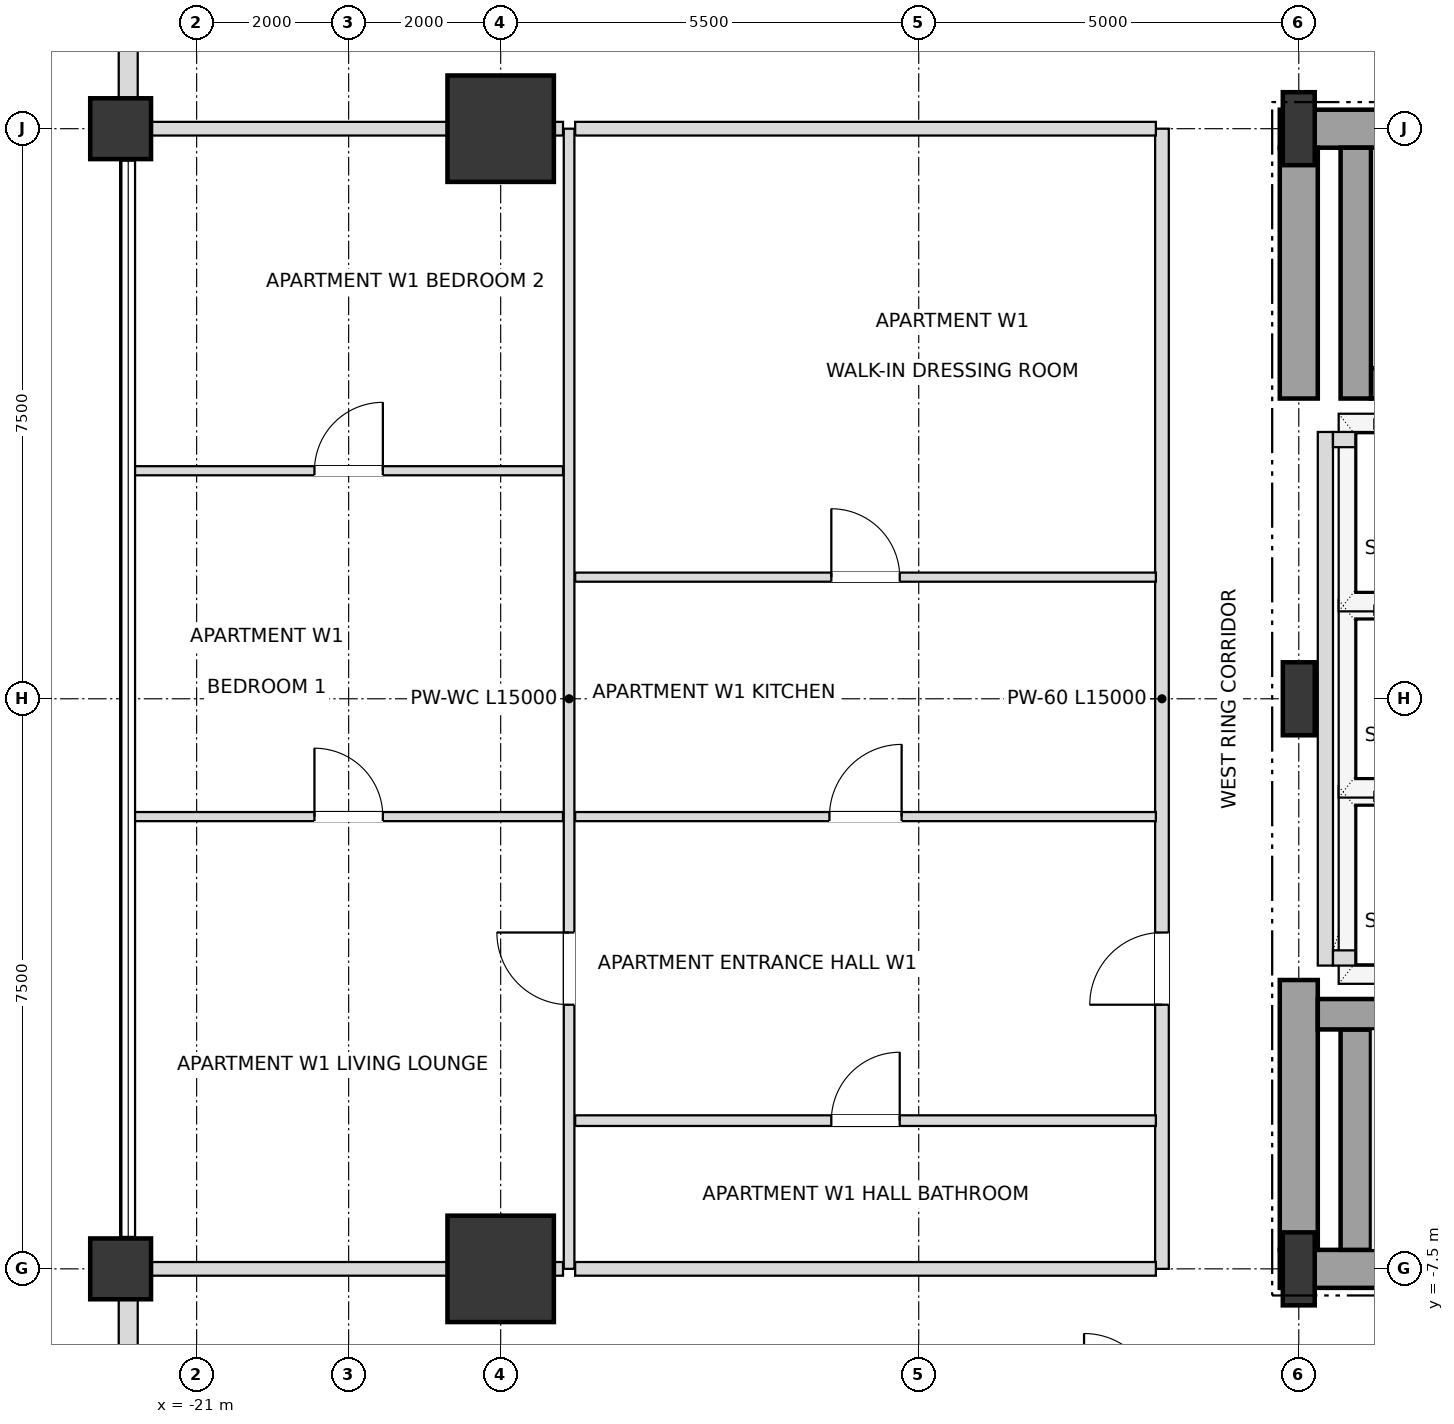
"""IFC4 building model, lengths in metres.
Left out: names, types, materials, properties, quantities, classifications, styles, units other than length and angle.
Written with IfcOpenShell. Run it as: python <this file> out.ifc"""

import sys

from ifc_helpers import new_model, si_unit, direction, frame, frame_2d, origin, origin_2d, place, context, subcontext, project, spatial, rectangle, i_section, extrude, element, fill, save


model = new_model("IFC4")
c1 = context("Model", 3, precision=1e-05, world=origin(), true_north=direction((0.0, 1.0)))
c2 = subcontext(c1, "Body", "Model", "MODEL_VIEW")
j1 = project(units=[si_unit("LENGTHUNIT", "METRE"), si_unit("PLANEANGLEUNIT", "RADIAN")], contexts=[c1])
p1 = place(None, origin())
s1 = spatial("IfcSite", under=j1, at=p1, CompositionType="ELEMENT")
p2 = place(p1, origin())
s2 = spatial("IfcBuilding", under=s1, at=p2, CompositionType="ELEMENT")
p3 = place(p2, frame((0.0, 0.0, 64.8)))
s3 = spatial("IfcBuildingStorey", under=s2, at=p3, CompositionType="ELEMENT", Elevation=64.8)
for number, where, z_axis, x_axis in (
    (1, (-6.5, -7.5, 0.0), (0.0, 0.0, 1.0), (1.0, 0.0, 0.0)),
    (2, (-6.5, 0.0, 0.0), (0.0, 0.0, 1.0), (1.0, 0.0, 0.0)),
    (3, (-6.5, 7.5, 0.0), (0.0, 0.0, 1.0), (1.0, 0.0, 0.0)),
):
    element("IfcColumn", number, at=place(p3, frame(where, z_axis=z_axis, x_axis=x_axis)), inside=s3, PredefinedType="COLUMN", context=c2, shape_type="SweptSolid", body=[
        extrude(i_section(OverallWidth=0.42, OverallDepth=0.96, WebThickness=0.022, FlangeThickness=0.034, at=origin_2d()), origin(), (0.0, 0.0, 1.0), 3.6),
    ])
for number, where, z_axis, x_axis in (
    (4, (-17.0, 7.5, 0.0), (0.0, 0.0, 1.0), (1.0, 0.0, 0.0)),
    (5, (-17.0, -7.5, 0.0), (0.0, 0.0, 1.0), (1.0, 0.0, 0.0)),
):
    element("IfcColumn", number, at=place(p3, frame(where, z_axis=z_axis, x_axis=x_axis)), inside=s3, PredefinedType="USERDEFINED", context=c2, shape_type="SweptSolid", body=[
        extrude(rectangle(XDim=1.4, YDim=1.4, at=origin_2d()), origin(), (0.0, 0.0, 1.0), 3.6),
    ])
for number, where, z_axis, x_axis in (
    (6, (-22.0, -7.5, 0.0), (0.0, 0.0, 1.0), (1.0, 0.0, 0.0)),
    (7, (-22.0, 7.5, 0.0), (0.0, 0.0, 1.0), (1.0, 0.0, 0.0)),
):
    element("IfcColumn", number, at=place(p3, frame(where, z_axis=z_axis, x_axis=x_axis)), inside=s3, PredefinedType="COLUMN", context=c2, shape_type="SweptSolid", body=[
        extrude(rectangle(XDim=0.8, YDim=0.8, at=origin_2d()), origin(), (0.0, 0.0, 1.0), 3.6),
    ])
p4 = place(p3, frame((-21.9, 12.605, 0.0), z_axis=(0.0, 0.0, 1.0), x_axis=(0.0, -1.0, 0.0)))
e8 = element("IfcWall", 8, at=p4, inside=s3, PredefinedType="SOLIDWALL", context=c2, shape_type="SweptSolid", body=[
    extrude(rectangle(XDim=4.71, YDim=0.25, at=frame_2d((2.355, 0.0))), origin(), (0.0, 0.0, 1.0), 2.736),
])
p5 = place(p4, frame((1.455, 0.0, 0.72)))
e9 = element("IfcOpeningElement", 9, at=p5, cuts=e8, PredefinedType="OPENING", context=c2, shape_type="SweptSolid", body=[
    extrude(rectangle(XDim=1.8, YDim=1.68, at=frame_2d((0.9, 0.84))), frame((0.0, 0.135, 0.0), z_axis=(0.0, -1.0, 0.0), x_axis=(1.0, 0.0, 0.0)), (0.0, 0.0, 1.0), 0.27),
])
p6 = place(p3, frame((-21.9, -7.895, 0.0), z_axis=(0.0, 0.0, 1.0), x_axis=(0.0, -1.0, 0.0)))
e10 = element("IfcWall", 10, at=p6, inside=s3, PredefinedType="SOLIDWALL", context=c2, shape_type="SweptSolid", body=[
    extrude(rectangle(XDim=4.71, YDim=0.25, at=frame_2d((2.355, 0.0))), origin(), (0.0, 0.0, 1.0), 2.736),
])
p7 = place(p6, frame((1.455, 0.0, 0.72)))
e11 = element("IfcOpeningElement", 11, at=p7, cuts=e10, PredefinedType="OPENING", context=c2, shape_type="SweptSolid", body=[
    extrude(rectangle(XDim=1.8, YDim=1.68, at=frame_2d((0.9, 0.84))), frame((0.0, 0.135, 0.0), z_axis=(0.0, -1.0, 0.0), x_axis=(1.0, 0.0, 0.0)), (0.0, 0.0, 1.0), 0.27),
])
p8 = place(p3, frame((-6.75, -7.5, 0.0), z_axis=(0.0, 0.0, 1.0), x_axis=(1.0, 0.0, 0.0)))
e12 = element("IfcWall", 12, at=p8, inside=s3, PredefinedType="SHEAR", context=c2, shape_type="SweptSolid", body=[
    extrude(rectangle(XDim=6.75, YDim=0.5, at=frame_2d((3.375, 0.0))), origin(), (0.0, 0.0, 1.0), 3.38),
])
p9 = place(p3, frame((-6.75, 7.5, 0.0), z_axis=(0.0, 0.0, 1.0), x_axis=(1.0, 0.0, 0.0)))
e13 = element("IfcWall", 13, at=p9, inside=s3, PredefinedType="SHEAR", context=c2, shape_type="SweptSolid", body=[
    extrude(rectangle(XDim=6.75, YDim=0.5, at=frame_2d((3.375, 0.0))), origin(), (0.0, 0.0, 1.0), 3.38),
])
p10 = place(p9, frame((1.65, 0.0, 0.0)))
e14 = element("IfcOpeningElement", 14, at=p10, cuts=e13, PredefinedType="OPENING", context=c2, shape_type="SweptSolid", body=[
    extrude(rectangle(XDim=1.05, YDim=2.15, at=frame_2d((0.525, 1.075))), frame((0.0, 0.26, 0.0), z_axis=(0.0, -1.0, 0.0), x_axis=(1.0, 0.0, 0.0)), (0.0, 0.0, 1.0), 0.52),
])
p11 = place(p3, frame((-6.5, -7.25, 0.0), z_axis=(0.0, 0.0, 1.0), x_axis=(0.0, 1.0, 0.0)))
e15 = element("IfcWall", 15, at=p11, inside=s3, PredefinedType="SHEAR", context=c2, shape_type="SweptSolid", body=[
    extrude(rectangle(XDim=3.55, YDim=0.5, at=frame_2d((1.775, 0.0))), origin(), (0.0, 0.0, 1.0), 3.38),
])
p12 = place(p3, frame((-6.5, 3.95, 0.0), z_axis=(0.0, 0.0, 1.0), x_axis=(0.0, 1.0, 0.0)))
e16 = element("IfcWall", 16, at=p12, inside=s3, PredefinedType="SHEAR", context=c2, shape_type="SweptSolid", body=[
    extrude(rectangle(XDim=3.3, YDim=0.5, at=frame_2d((1.65, 0.0))), origin(), (0.0, 0.0, 1.0), 3.38),
])
p13 = place(p3, frame((-5.75, -7.25, 0.0), z_axis=(0.0, 0.0, 1.0), x_axis=(0.0, 1.0, 0.0)))
e17 = element("IfcWall", 17, at=p13, inside=s3, PredefinedType="SHEAR", context=c2, shape_type="SweptSolid", body=[
    extrude(rectangle(XDim=2.9, YDim=0.4, at=frame_2d((1.45, 0.0))), origin(), (0.0, 0.0, 1.0), 3.38),
])
p14 = place(p3, frame((-6.25, -4.15, 0.0), z_axis=(0.0, 0.0, 1.0), x_axis=(1.0, 0.0, 0.0)))
e18 = element("IfcWall", 18, at=p14, inside=s3, PredefinedType="SHEAR", context=c2, shape_type="SweptSolid", body=[
    extrude(rectangle(XDim=7.78, YDim=0.4, at=frame_2d((3.89, 0.0))), origin(), (0.0, 0.0, 1.0), 3.38),
])
p15 = place(p3, frame((-5.55, 4.15, 0.0), z_axis=(0.0, 0.0, 1.0), x_axis=(1.0, 0.0, 0.0)))
e19 = element("IfcWall", 19, at=p15, inside=s3, PredefinedType="SHEAR", context=c2, shape_type="SweptSolid", body=[
    extrude(rectangle(XDim=7.08, YDim=0.4, at=frame_2d((3.54, 0.0))), origin(), (0.0, 0.0, 1.0), 3.38),
])
p16 = place(p3, frame((-5.75, 3.95, 0.0), z_axis=(0.0, 0.0, 1.0), x_axis=(0.0, 1.0, 0.0)))
e20 = element("IfcWall", 20, at=p16, inside=s3, PredefinedType="SHEAR", context=c2, shape_type="SweptSolid", body=[
    extrude(rectangle(XDim=3.3, YDim=0.4, at=frame_2d((1.65, 0.0))), origin(), (0.0, 0.0, 1.0), 3.38),
])
p17 = place(p3, frame((-6.15, -3.51, 0.0), z_axis=(0.0, 0.0, 1.0), x_axis=(0.0, 1.0, 0.0)))
e21 = element("IfcWall", 21, at=p17, inside=s3, PredefinedType="SOLIDWALL", context=c2, shape_type="SweptSolid", body=[
    extrude(rectangle(XDim=7.02, YDim=0.2, at=frame_2d((3.51, 0.0))), origin(), (0.0, 0.0, 1.0), 3.38),
])
for number, where, z_axis, x_axis in (
    (22, (-6.05, -3.41, 0.0), (0.0, 0.0, 1.0), (1.0, 0.0, 0.0)),
    (23, (-6.05, 3.41, 0.0), (0.0, 0.0, 1.0), (1.0, 0.0, 0.0)),
):
    element("IfcWall", number, at=place(p3, frame(where, z_axis=z_axis, x_axis=x_axis)), inside=s3, PredefinedType="SOLIDWALL", context=c2, shape_type="SweptSolid", body=[
        extrude(rectangle(XDim=2.2, YDim=0.2, at=frame_2d((1.1, 0.0))), origin(), (0.0, 0.0, 1.0), 3.38),
    ])
p18 = place(p3, frame((-16.1, -7.5, 0.0), z_axis=(0.0, 0.0, 1.0), x_axis=(0.0, 1.0, 0.0)))
e24 = element("IfcWall", 24, at=p18, inside=s3, PredefinedType="PARTITIONING", context=c2, shape_type="SweptSolid", body=[
    extrude(rectangle(XDim=15.0, YDim=0.14, at=frame_2d((7.5, 0.0))), origin(), (0.0, 0.0, 1.0), 3.38),
])
p19 = place(p18, frame((3.475, 0.0, 0.0)))
e25 = element("IfcOpeningElement", 25, at=p19, cuts=e24, PredefinedType="OPENING", context=c2, shape_type="SweptSolid", body=[
    extrude(rectangle(XDim=0.95, YDim=2.1, at=frame_2d((0.475, 1.05))), frame((0.0, 0.08, 0.0), z_axis=(0.0, -1.0, 0.0), x_axis=(1.0, 0.0, 0.0)), (0.0, 0.0, 1.0), 0.16),
])
p20 = place(p3, frame((-8.3, -7.5, 0.0), z_axis=(0.0, 0.0, 1.0), x_axis=(0.0, 1.0, 0.0)))
e26 = element("IfcWall", 26, at=p20, inside=s3, PredefinedType="PARTITIONING", context=c2, shape_type="SweptSolid", body=[
    extrude(rectangle(XDim=15.0, YDim=0.18, at=frame_2d((7.5, 0.0))), origin(), (0.0, 0.0, 1.0), 3.38),
])
p21 = place(p20, frame((3.475, 0.0, 0.0)))
e27 = element("IfcOpeningElement", 27, at=p21, cuts=e26, PredefinedType="OPENING", context=c2, shape_type="SweptSolid", body=[
    extrude(rectangle(XDim=0.95, YDim=2.15, at=frame_2d((0.475, 1.075))), frame((0.0, 0.1, 0.0), z_axis=(0.0, -1.0, 0.0), x_axis=(1.0, 0.0, 0.0)), (0.0, 0.0, 1.0), 0.2),
])
p22 = place(p3, frame((-21.9, -7.5, 0.0), z_axis=(0.0, 0.0, 1.0), x_axis=(1.0, 0.0, 0.0)))
e28 = element("IfcWall", 28, at=p22, inside=s3, PredefinedType="PARTITIONING", context=c2, shape_type="SweptSolid", body=[
    extrude(rectangle(XDim=5.72, YDim=0.18, at=frame_2d((2.86, 0.0))), origin(), (0.0, 0.0, 1.0), 2.816),
])
p23 = place(p3, frame((-16.02, -7.5, 0.0), z_axis=(0.0, 0.0, 1.0), x_axis=(1.0, 0.0, 0.0)))
e29 = element("IfcWall", 29, at=p23, inside=s3, PredefinedType="PARTITIONING", context=c2, shape_type="SweptSolid", body=[
    extrude(rectangle(XDim=7.64, YDim=0.18, at=frame_2d((3.82, 0.0))), origin(), (0.0, 0.0, 1.0), 2.816),
])
p24 = place(p3, frame((-16.02, -5.55, 0.0), z_axis=(0.0, 0.0, 1.0), x_axis=(1.0, 0.0, 0.0)))
e30 = element("IfcWall", 30, at=p24, inside=s3, PredefinedType="PARTITIONING", context=c2, shape_type="SweptSolid", body=[
    extrude(rectangle(XDim=7.64, YDim=0.14, at=frame_2d((3.82, 0.0))), origin(), (0.0, 0.0, 1.0), 2.948),
])
p25 = place(p24, frame((3.37, 0.0, 0.0)))
e31 = element("IfcOpeningElement", 31, at=p25, cuts=e30, PredefinedType="OPENING", context=c2, shape_type="SweptSolid", body=[
    extrude(rectangle(XDim=0.9, YDim=2.1, at=frame_2d((0.45, 1.05))), frame((0.0, 0.08, 0.0), z_axis=(0.0, -1.0, 0.0), x_axis=(1.0, 0.0, 0.0)), (0.0, 0.0, 1.0), 0.16),
])
p26 = place(p3, frame((-21.82, -1.55, 0.0), z_axis=(0.0, 0.0, 1.0), x_axis=(1.0, 0.0, 0.0)))
e32 = element("IfcWall", 32, at=p26, inside=s3, PredefinedType="PARTITIONING", context=c2, shape_type="SweptSolid", body=[
    extrude(rectangle(XDim=5.64, YDim=0.12, at=frame_2d((2.82, 0.0))), origin(), (0.0, 0.0, 1.0), 2.816),
])
p27 = place(p26, frame((2.37, 0.0, 0.0)))
e33 = element("IfcOpeningElement", 33, at=p27, cuts=e32, PredefinedType="OPENING", context=c2, shape_type="SweptSolid", body=[
    extrude(rectangle(XDim=0.9, YDim=2.1, at=frame_2d((0.45, 1.05))), frame((0.0, 0.07, 0.0), z_axis=(0.0, -1.0, 0.0), x_axis=(1.0, 0.0, 0.0)), (0.0, 0.0, 1.0), 0.14),
])
p28 = place(p3, frame((-16.02, -1.55, 0.0), z_axis=(0.0, 0.0, 1.0), x_axis=(1.0, 0.0, 0.0)))
e34 = element("IfcWall", 34, at=p28, inside=s3, PredefinedType="PARTITIONING", context=c2, shape_type="SweptSolid", body=[
    extrude(rectangle(XDim=7.64, YDim=0.12, at=frame_2d((3.82, 0.0))), origin(), (0.0, 0.0, 1.0), 2.948),
])
p29 = place(p28, frame((3.345, 0.0, 0.0)))
e35 = element("IfcOpeningElement", 35, at=p29, cuts=e34, PredefinedType="OPENING", context=c2, shape_type="SweptSolid", body=[
    extrude(rectangle(XDim=0.95, YDim=2.1, at=frame_2d((0.475, 1.05))), frame((0.0, 0.07, 0.0), z_axis=(0.0, -1.0, 0.0), x_axis=(1.0, 0.0, 0.0)), (0.0, 0.0, 1.0), 0.14),
])
p30 = place(p3, frame((-16.02, 1.6, 0.0), z_axis=(0.0, 0.0, 1.0), x_axis=(1.0, 0.0, 0.0)))
e36 = element("IfcWall", 36, at=p30, inside=s3, PredefinedType="PARTITIONING", context=c2, shape_type="SweptSolid", body=[
    extrude(rectangle(XDim=7.64, YDim=0.12, at=frame_2d((3.82, 0.0))), origin(), (0.0, 0.0, 1.0), 2.948),
])
p31 = place(p30, frame((3.37, 0.0, 0.0)))
e37 = element("IfcOpeningElement", 37, at=p31, cuts=e36, PredefinedType="OPENING", context=c2, shape_type="SweptSolid", body=[
    extrude(rectangle(XDim=0.9, YDim=2.1, at=frame_2d((0.45, 1.05))), frame((0.0, 0.07, 0.0), z_axis=(0.0, -1.0, 0.0), x_axis=(1.0, 0.0, 0.0)), (0.0, 0.0, 1.0), 0.14),
])
p32 = place(p3, frame((-21.82, 3.0, 0.0), z_axis=(0.0, 0.0, 1.0), x_axis=(1.0, 0.0, 0.0)))
e38 = element("IfcWall", 38, at=p32, inside=s3, PredefinedType="PARTITIONING", context=c2, shape_type="SweptSolid", body=[
    extrude(rectangle(XDim=5.64, YDim=0.12, at=frame_2d((2.82, 0.0))), origin(), (0.0, 0.0, 1.0), 2.816),
])
p33 = place(p32, frame((2.37, 0.0, 0.0)))
e39 = element("IfcOpeningElement", 39, at=p33, cuts=e38, PredefinedType="OPENING", context=c2, shape_type="SweptSolid", body=[
    extrude(rectangle(XDim=0.9, YDim=2.1, at=frame_2d((0.45, 1.05))), frame((0.0, 0.07, 0.0), z_axis=(0.0, -1.0, 0.0), x_axis=(1.0, 0.0, 0.0)), (0.0, 0.0, 1.0), 0.14),
])
p34 = place(p3, frame((-21.9, 7.5, 0.0), z_axis=(0.0, 0.0, 1.0), x_axis=(1.0, 0.0, 0.0)))
e40 = element("IfcWall", 40, at=p34, inside=s3, PredefinedType="PARTITIONING", context=c2, shape_type="SweptSolid", body=[
    extrude(rectangle(XDim=5.72, YDim=0.18, at=frame_2d((2.86, 0.0))), origin(), (0.0, 0.0, 1.0), 2.816),
])
p35 = place(p3, frame((-16.02, 7.5, 0.0), z_axis=(0.0, 0.0, 1.0), x_axis=(1.0, 0.0, 0.0)))
e41 = element("IfcWall", 41, at=p35, inside=s3, PredefinedType="PARTITIONING", context=c2, shape_type="SweptSolid", body=[
    extrude(rectangle(XDim=7.64, YDim=0.18, at=frame_2d((3.82, 0.0))), origin(), (0.0, 0.0, 1.0), 2.816),
])
p36 = place(p25, origin())
e42 = element("IfcDoor", 42, at=p36, inside=s3, OperationType="SINGLE_SWING_RIGHT", PredefinedType="DOOR", context=c2, shape_type="SweptSolid", body=[
    extrude(rectangle(XDim=0.9, YDim=2.1, at=frame_2d((0.45, 1.05))), frame((0.0, 0.025, 0.0), z_axis=(0.0, -1.0, 0.0), x_axis=(1.0, 0.0, 0.0)), (0.0, 0.0, 1.0), 0.05),
])
fill(e31, e42)
p37 = place(p21, origin())
e43 = element("IfcDoor", 43, at=p37, inside=s3, OperationType="SINGLE_SWING_LEFT", PredefinedType="DOOR", context=c2, shape_type="SweptSolid", body=[
    extrude(rectangle(XDim=0.95, YDim=2.15, at=frame_2d((0.475, 1.075))), frame((0.0, 0.025, 0.0), z_axis=(0.0, -1.0, 0.0), x_axis=(1.0, 0.0, 0.0)), (0.0, 0.0, 1.0), 0.05),
])
fill(e27, e43)
p38 = place(p29, origin())
e44 = element("IfcDoor", 44, at=p38, inside=s3, OperationType="SINGLE_SWING_RIGHT", PredefinedType="DOOR", context=c2, shape_type="SweptSolid", body=[
    extrude(rectangle(XDim=0.95, YDim=2.1, at=frame_2d((0.475, 1.05))), frame((0.0, 0.025, 0.0), z_axis=(0.0, -1.0, 0.0), x_axis=(1.0, 0.0, 0.0)), (0.0, 0.0, 1.0), 0.05),
])
fill(e35, e44)
p39 = place(p31, origin())
e45 = element("IfcDoor", 45, at=p39, inside=s3, OperationType="SINGLE_SWING_LEFT", PredefinedType="DOOR", context=c2, shape_type="SweptSolid", body=[
    extrude(rectangle(XDim=0.9, YDim=2.1, at=frame_2d((0.45, 1.05))), frame((0.0, 0.025, 0.0), z_axis=(0.0, -1.0, 0.0), x_axis=(1.0, 0.0, 0.0)), (0.0, 0.0, 1.0), 0.05),
])
fill(e37, e45)
p40 = place(p19, origin())
e46 = element("IfcDoor", 46, at=p40, inside=s3, OperationType="SINGLE_SWING_RIGHT", PredefinedType="DOOR", context=c2, shape_type="SweptSolid", body=[
    extrude(rectangle(XDim=0.95, YDim=2.1, at=frame_2d((0.475, 1.05))), frame((0.0, 0.025, 0.0), z_axis=(0.0, -1.0, 0.0), x_axis=(1.0, 0.0, 0.0)), (0.0, 0.0, 1.0), 0.05),
])
fill(e25, e46)
p41 = place(p27, origin())
e47 = element("IfcDoor", 47, at=p41, inside=s3, OperationType="SINGLE_SWING_LEFT", PredefinedType="DOOR", context=c2, shape_type="SweptSolid", body=[
    extrude(rectangle(XDim=0.9, YDim=2.1, at=frame_2d((0.45, 1.05))), frame((0.0, 0.025, 0.0), z_axis=(0.0, -1.0, 0.0), x_axis=(1.0, 0.0, 0.0)), (0.0, 0.0, 1.0), 0.05),
])
fill(e33, e47)
p42 = place(p33, origin())
e48 = element("IfcDoor", 48, at=p42, inside=s3, OperationType="SINGLE_SWING_RIGHT", PredefinedType="DOOR", context=c2, shape_type="SweptSolid", body=[
    extrude(rectangle(XDim=0.9, YDim=2.1, at=frame_2d((0.45, 1.05))), frame((0.0, 0.025, 0.0), z_axis=(0.0, -1.0, 0.0), x_axis=(1.0, 0.0, 0.0)), (0.0, 0.0, 1.0), 0.05),
])
fill(e39, e48)
save(model, sys.argv[1])
